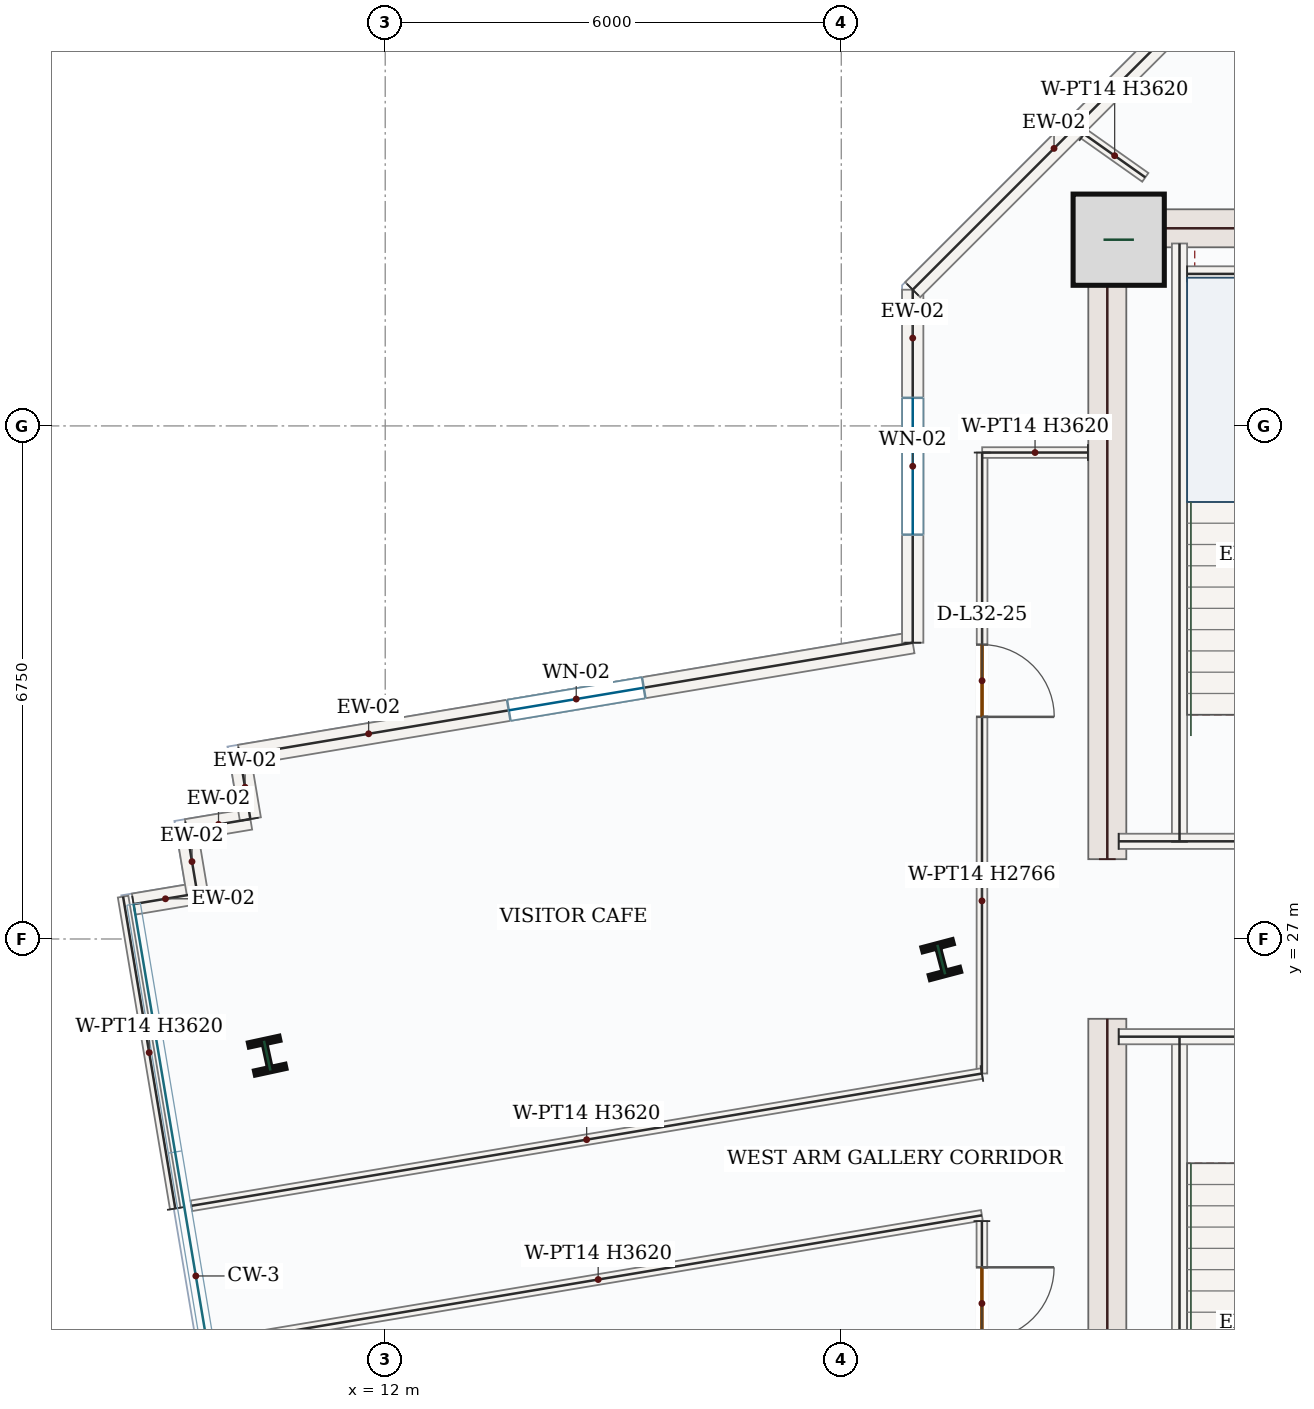
"""IFC4 building model, lengths in metres.
Left out: names, types, materials, properties, quantities, classifications, styles, units other than length and angle.
Written with IfcOpenShell. Run it as: python <this file> out.ifc"""

import sys

from ifc_helpers import new_model, si_unit, direction, frame, frame_2d, origin, origin_2d, place, context, subcontext, project, spatial, rectangle, i_section, extrude, source, transform, mapped, element, fill, save


model = new_model("IFC4")
c1 = context("Model", 3, precision=1e-05, world=origin(), true_north=direction((0.0, 1.0)))
c2 = subcontext(c1, "Body", "Model", "MODEL_VIEW")
j1 = project(units=[si_unit("LENGTHUNIT", "METRE"), si_unit("PLANEANGLEUNIT", "RADIAN")], contexts=[c1])
p1 = place(None, origin())
s1 = spatial("IfcSite", under=j1, at=p1, CompositionType="ELEMENT")
p2 = place(p1, origin())
s2 = spatial("IfcBuilding", under=s1, at=p2, CompositionType="ELEMENT")
p3 = place(p2, frame((0.0, 0.0, 143.4)))
s3 = spatial("IfcBuildingStorey", under=s2, at=p3, CompositionType="ELEMENT", Elevation=143.4)
m1 = source(origin(), c2, "Body", "SweptSolid", [
    extrude(rectangle(XDim=8.55, YDim=0.5, at=frame_2d((4.275, 0.0))), origin(), (0.0, 0.0, 1.0), 3.62),
])
for number, where, z_axis, x_axis in (
    (1, (21.5, 17.4, 0.0), (0.0, 0.0, 1.0), (0.0, 1.0, 0.0)),
    (2, (21.5, 28.05, 0.0), (0.0, 0.0, 1.0), (0.0, 1.0, 0.0)),
):
    element("IfcWall", number, at=place(p3, frame(where, z_axis=z_axis, x_axis=x_axis)), inside=s3, PredefinedType="SHEAR", context=c2, shape_type="MappedRepresentation", body=[
        mapped(m1, transform((0.0, 0.0, 0.0), x_axis=(1.0, 0.0, 0.0), y_axis=(0.0, 1.0, 0.0), z_axis=(0.0, 0.0, 1.0), scale=1.0)),
    ])
m2 = source(origin(), c2, "Body", "SweptSolid", [
    extrude(rectangle(XDim=7.0, YDim=0.5, at=frame_2d((3.5, 0.0))), origin(), (0.0, 0.0, 1.0), 3.62),
])
p4 = place(p3, frame((21.75, 36.35, 0.0), z_axis=(0.0, 0.0, 1.0), x_axis=(1.0, 0.0, 0.0)))
e3 = element("IfcWall", 3, at=p4, inside=s3, PredefinedType="SHEAR", context=c2, shape_type="MappedRepresentation", body=[
    mapped(m2, transform((0.0, 0.0, 0.0), x_axis=(1.0, 0.0, 0.0), y_axis=(0.0, 1.0, 0.0), z_axis=(0.0, 0.0, 1.0), scale=1.0)),
])
m3 = source(origin(), c2, "Body", "SweptSolid", [
    extrude(rectangle(XDim=1.2, YDim=1.2, at=origin_2d()), origin(), (0.0, 0.0, 1.0), 3.9),
])
p5 = place(p3, frame((21.65, 36.2, 0.0), z_axis=(0.0, 0.0, 1.0), x_axis=(1.0, 0.0, 0.0)))
e4 = element("IfcColumn", 4, at=p5, inside=s3, PredefinedType="COLUMN", context=c2, shape_type="MappedRepresentation", body=[
    mapped(m3, transform((0.0, 0.0, 0.0), x_axis=(1.0, 0.0, 0.0), y_axis=(0.0, 1.0, 0.0), z_axis=(0.0, 0.0, 1.0), scale=1.0)),
])
m4 = source(origin(), c2, "Body", "SweptSolid", [
    extrude(i_section(OverallWidth=0.412, OverallDepth=0.435, WebThickness=0.036, FlangeThickness=0.057, FilletRadius=0.018, at=origin_2d()), origin(), (0.0, 0.0, 1.0), 3.9),
])
for number, where, z_axis, x_axis in (
    (5, (19.316, 26.729, 0.0), (0.0, 0.0, 1.0), (0.967, 0.255, 0.0)),
    (6, (10.447, 25.465, 0.0), (0.0, 0.0, 1.0), (0.977, 0.211, 0.0)),
):
    element("IfcColumn", number, at=place(p3, frame(where, z_axis=z_axis, x_axis=x_axis)), inside=s3, PredefinedType="COLUMN", context=c2, shape_type="MappedRepresentation", body=[
        mapped(m4, transform((0.0, 0.0, 0.0), x_axis=(1.0, 0.0, 0.0), y_axis=(0.0, 1.0, 0.0), z_axis=(0.0, 0.0, 1.0), scale=1.0)),
    ])
m5 = source(origin(), c2, "Body", "SweptSolid", [
    extrude(rectangle(XDim=0.85, YDim=0.28, at=frame_2d((0.425, 0.0))), origin(), (0.0, 0.0, 1.0), 3.62),
])
for number, where, z_axis, x_axis in (
    (7, (8.69, 27.459, 0.0), (0.0, 0.0, 1.0), (0.986, 0.165, 0.0)),
    (8, (9.528, 27.599, 0.0), (0.0, 0.0, 1.0), (-0.165, 0.986, 0.0)),
    (9, (9.388, 28.438, 0.0), (0.0, 0.0, 1.0), (0.986, 0.165, 0.0)),
    (10, (10.226, 28.578, 0.0), (0.0, 0.0, 1.0), (-0.165, 0.986, 0.0)),
):
    element("IfcWall", number, at=place(p3, frame(where, z_axis=z_axis, x_axis=x_axis)), inside=s3, PredefinedType="SOLIDWALL", context=c2, shape_type="MappedRepresentation", body=[
        mapped(m5, transform((0.0, 0.0, 0.0), x_axis=(1.0, 0.0, 0.0), y_axis=(0.0, 1.0, 0.0), z_axis=(0.0, 0.0, 1.0), scale=1.0)),
    ])
p6 = place(p3, frame((10.086, 29.416, 0.0), z_axis=(0.0, 0.0, 1.0), x_axis=(0.98628492446, 0.165051651865, 0.0)))
e11 = element("IfcWall", 11, at=p6, inside=s3, PredefinedType="SOLIDWALL", context=c2, shape_type="SweptSolid", body=[
    extrude(rectangle(XDim=8.977, YDim=0.28, at=frame_2d((4.489, 0.0))), origin(), (0.0, 0.0, 1.0), 3.62),
])
p7 = place(p6, frame((3.589, 0.0, 0.85)))
e12 = element("IfcOpeningElement", 12, at=p7, cuts=e11, PredefinedType="OPENING", context=c2, shape_type="SweptSolid", body=[
    extrude(rectangle(XDim=1.8, YDim=1.75, at=frame_2d((0.9, 0.875))), frame((0.0, 0.15, 0.0), z_axis=(0.0, -1.0, 0.0), x_axis=(1.0, 0.0, 0.0)), (0.0, 0.0, 1.0), 0.3),
])
p8 = place(p3, frame((18.94, 30.898, 0.0), z_axis=(0.0, 0.0, 1.0), x_axis=(0.0, 1.0, 0.0)))
e13 = element("IfcWall", 13, at=p8, inside=s3, PredefinedType="SOLIDWALL", context=c2, shape_type="SweptSolid", body=[
    extrude(rectangle(XDim=4.644, YDim=0.28, at=frame_2d((2.322, 0.0))), origin(), (0.0, 0.0, 1.0), 3.62),
])
p9 = place(p8, frame((1.422, 0.0, 0.85)))
e14 = element("IfcOpeningElement", 14, at=p9, cuts=e13, PredefinedType="OPENING", context=c2, shape_type="SweptSolid", body=[
    extrude(rectangle(XDim=1.8, YDim=1.75, at=frame_2d((0.9, 0.875))), frame((0.0, 0.15, 0.0), z_axis=(0.0, -1.0, 0.0), x_axis=(1.0, 0.0, 0.0)), (0.0, 0.0, 1.0), 0.3),
])
m6 = source(origin(), c2, "Body", "SweptSolid", [
    extrude(rectangle(XDim=5.258, YDim=0.28, at=frame_2d((2.629, 0.0))), origin(), (0.0, 0.0, 1.0), 3.62),
])
p10 = place(p3, frame((18.94, 35.542, 0.0), z_axis=(0.0, 0.0, 1.0), x_axis=(0.707106781187, 0.707106781187, 0.0)))
e15 = element("IfcWall", 15, at=p10, inside=s3, PredefinedType="SOLIDWALL", context=c2, shape_type="MappedRepresentation", body=[
    mapped(m6, transform((0.0, 0.0, 0.0), x_axis=(1.0, 0.0, 0.0), y_axis=(0.0, 1.0, 0.0), z_axis=(0.0, 0.0, 1.0), scale=1.0)),
])
m7 = source(origin(), c2, "Body", "SweptSolid", [
    extrude(rectangle(XDim=7.87, YDim=0.2, at=frame_2d((3.935, 0.0))), origin(), (0.0, 0.0, 1.0), 3.62),
])
for number, where, z_axis, x_axis in (
    (16, (22.45, 17.85, 0.0), (0.0, 0.0, 1.0), (0.0, 1.0, 0.0)),
    (17, (22.45, 28.28, 0.0), (0.0, 0.0, 1.0), (0.0, 1.0, 0.0)),
):
    element("IfcWall", number, at=place(p3, frame(where, z_axis=z_axis, x_axis=x_axis)), inside=s3, PredefinedType="SOLIDWALL", context=c2, shape_type="MappedRepresentation", body=[
        mapped(m7, transform((0.0, 0.0, 0.0), x_axis=(1.0, 0.0, 0.0), y_axis=(0.0, 1.0, 0.0), z_axis=(0.0, 0.0, 1.0), scale=1.0)),
    ])
m8 = source(origin(), c2, "Body", "SweptSolid", [
    extrude(rectangle(XDim=4.25, YDim=0.2, at=frame_2d((2.125, 0.0))), origin(), (0.0, 0.0, 1.0), 3.62),
])
for number, where, z_axis, x_axis in (
    (18, (21.65, 25.715, 0.0), (0.0, 0.0, 1.0), (1.0, 0.0, 0.0)),
    (19, (21.65, 28.285, 0.0), (0.0, 0.0, 1.0), (1.0, 0.0, 0.0)),
):
    element("IfcWall", number, at=place(p3, frame(where, z_axis=z_axis, x_axis=x_axis)), inside=s3, PredefinedType="SOLIDWALL", context=c2, shape_type="MappedRepresentation", body=[
        mapped(m8, transform((0.0, 0.0, 0.0), x_axis=(1.0, 0.0, 0.0), y_axis=(0.0, 1.0, 0.0), z_axis=(0.0, 0.0, 1.0), scale=1.0)),
    ])
m9 = source(origin(), c2, "Body", "SweptSolid", [
    extrude(rectangle(XDim=3.25, YDim=0.2, at=frame_2d((1.625, 0.0))), origin(), (0.0, 0.0, 1.0), 3.62),
])
p11 = place(p3, frame((22.55, 35.75, 0.0), z_axis=(0.0, 0.0, 1.0), x_axis=(1.0, 0.0, 0.0)))
e20 = element("IfcWall", 20, at=p11, inside=s3, PredefinedType="SOLIDWALL", context=c2, shape_type="MappedRepresentation", body=[
    mapped(m9, transform((0.0, 0.0, 0.0), x_axis=(1.0, 0.0, 0.0), y_axis=(0.0, 1.0, 0.0), z_axis=(0.0, 0.0, 1.0), scale=1.0)),
])
p12 = place(p3, frame((19.854, 33.399, 0.0), z_axis=(0.0, 0.0, 1.0), x_axis=(-0.000448283031, -0.999999899521, 0.0)))
e21 = element("IfcWall", 21, at=p12, inside=s3, PredefinedType="PARTITIONING", context=c2, shape_type="SweptSolid", body=[
    extrude(rectangle(XDim=8.169, YDim=0.14, at=frame_2d((4.084, 0.0))), origin(), (0.0, 0.0, 1.0), 2.766),
])
p13 = place(p12, frame((2.527, 0.0, 0.0)))
e22 = element("IfcOpeningElement", 22, at=p13, cuts=e21, PredefinedType="OPENING", context=c2, shape_type="SweptSolid", body=[
    extrude(rectangle(XDim=0.95, YDim=2.15, at=frame_2d((0.475, 1.075))), frame((0.0, 0.08, 0.0), z_axis=(0.0, -1.0, 0.0), x_axis=(1.0, 0.0, 0.0)), (0.0, 0.0, 1.0), 0.16),
])
m10 = source(origin(), c2, "Body", "SweptSolid", [
    extrude(rectangle(XDim=10.544, YDim=0.14, at=frame_2d((5.272, 0.0))), origin(), (0.0, 0.0, 1.0), 3.62),
])
p14 = place(p3, frame((19.85, 25.23, 0.0), z_axis=(0.0, 0.0, 1.0), x_axis=(-0.986287336963, -0.165037235031, 0.0)))
e23 = element("IfcWall", 23, at=p14, inside=s3, PredefinedType="PARTITIONING", context=c2, shape_type="MappedRepresentation", body=[
    mapped(m10, transform((0.0, 0.0, 0.0), x_axis=(1.0, 0.0, 0.0), y_axis=(0.0, 1.0, 0.0), z_axis=(0.0, 0.0, 1.0), scale=1.0)),
])
m11 = source(origin(), c2, "Body", "SweptSolid", [
    extrude(rectangle(XDim=4.16, YDim=0.14, at=frame_2d((2.08, 0.0))), origin(), (0.0, 0.0, 1.0), 3.62),
])
p15 = place(p3, frame((9.238, 23.454, 0.0), z_axis=(0.0, 0.0, 1.0), x_axis=(-0.165027060507, 0.98628903943, 0.0)))
e24 = element("IfcWall", 24, at=p15, inside=s3, PredefinedType="PARTITIONING", context=c2, shape_type="MappedRepresentation", body=[
    mapped(m11, transform((0.0, 0.0, 0.0), x_axis=(1.0, 0.0, 0.0), y_axis=(0.0, 1.0, 0.0), z_axis=(0.0, 0.0, 1.0), scale=1.0)),
])
m12 = source(origin(), c2, "Body", "SweptSolid", [
    extrude(rectangle(XDim=0.988, YDim=0.14, at=frame_2d((0.494, 0.0))), origin(), (0.0, 0.0, 1.0), 3.62),
])
p16 = place(p3, frame((21.193, 37.59, 0.0), z_axis=(0.0, 0.0, 1.0), x_axis=(0.81652929337, -0.577304004029, 0.0)))
e25 = element("IfcWall", 25, at=p16, inside=s3, PredefinedType="PARTITIONING", context=c2, shape_type="MappedRepresentation", body=[
    mapped(m12, transform((0.0, 0.0, 0.0), x_axis=(1.0, 0.0, 0.0), y_axis=(0.0, 1.0, 0.0), z_axis=(0.0, 0.0, 1.0), scale=1.0)),
])
m13 = source(origin(), c2, "Body", "SweptSolid", [
    extrude(rectangle(XDim=1.391, YDim=0.14, at=frame_2d((0.696, 0.0))), origin(), (0.0, 0.0, 1.0), 3.62),
])
p17 = place(p3, frame((21.245, 33.4, 0.0), z_axis=(0.0, 0.0, 1.0), x_axis=(-0.999999938421, -0.00035093874, 0.0)))
e26 = element("IfcWall", 26, at=p17, inside=s3, PredefinedType="PARTITIONING", context=c2, shape_type="MappedRepresentation", body=[
    mapped(m13, transform((0.0, 0.0, 0.0), x_axis=(1.0, 0.0, 0.0), y_axis=(0.0, 1.0, 0.0), z_axis=(0.0, 0.0, 1.0), scale=1.0)),
])
m14 = source(origin(), c2, "Body", "SweptSolid", [
    extrude(rectangle(XDim=10.237, YDim=0.14, at=frame_2d((5.118, 0.0))), origin(), (0.0, 0.0, 1.0), 3.62),
])
p18 = place(p3, frame((9.754, 21.675, 0.0), z_axis=(0.0, 0.0, 1.0), x_axis=(0.986290594835, 0.165017764319, 0.0)))
e27 = element("IfcWall", 27, at=p18, inside=s3, PredefinedType="PARTITIONING", context=c2, shape_type="MappedRepresentation", body=[
    mapped(m14, transform((0.0, 0.0, 0.0), x_axis=(1.0, 0.0, 0.0), y_axis=(0.0, 1.0, 0.0), z_axis=(0.0, 0.0, 1.0), scale=1.0)),
])
p19 = place(p3, frame((19.85, 23.289, 0.0), z_axis=(0.0, 0.0, 1.0), x_axis=(0.000363372069, -0.99999993398, 0.0)))
e28 = element("IfcWall", 28, at=p19, inside=s3, PredefinedType="PARTITIONING", context=c2, shape_type="SweptSolid", body=[
    extrude(rectangle(XDim=2.688, YDim=0.14, at=frame_2d((1.344, 0.0))), origin(), (0.0, 0.0, 1.0), 3.149),
])
p20 = place(p19, frame((0.608, 0.0, 0.0)))
e29 = element("IfcOpeningElement", 29, at=p20, cuts=e28, PredefinedType="OPENING", context=c2, shape_type="SweptSolid", body=[
    extrude(rectangle(XDim=0.95, YDim=2.15, at=frame_2d((0.475, 1.075))), frame((0.0, 0.08, 0.0), z_axis=(0.0, -1.0, 0.0), x_axis=(1.0, 0.0, 0.0)), (0.0, 0.0, 1.0), 0.16),
])
m15 = source(origin(), c2, "Body", "SweptSolid", [
    extrude(rectangle(XDim=1.8, YDim=1.75, at=frame_2d((0.9, 0.875))), frame((0.0, 0.03, 0.0), z_axis=(0.0, -1.0, 0.0), x_axis=(1.0, 0.0, 0.0)), (0.0, 0.0, 1.0), 0.06),
])
p21 = place(p7, origin())
e30 = element("IfcWindow", 30, at=p21, inside=s3, PartitioningType="DOUBLE_PANEL_VERTICAL", PredefinedType="WINDOW", context=c2, shape_type="MappedRepresentation", body=[
    mapped(m15, transform((0.0, 0.0, 0.0), x_axis=(1.0, 0.0, 0.0), y_axis=(0.0, 1.0, 0.0), z_axis=(0.0, 0.0, 1.0), scale=1.0)),
])
fill(e12, e30)
p22 = place(p9, origin())
e31 = element("IfcWindow", 31, at=p22, inside=s3, PartitioningType="DOUBLE_PANEL_VERTICAL", PredefinedType="WINDOW", context=c2, shape_type="MappedRepresentation", body=[
    mapped(m15, transform((0.0, 0.0, 0.0), x_axis=(1.0, 0.0, 0.0), y_axis=(0.0, 1.0, 0.0), z_axis=(0.0, 0.0, 1.0), scale=1.0)),
])
fill(e14, e31)
m16 = source(origin(), c2, "Body", "SweptSolid", [
    extrude(rectangle(XDim=0.95, YDim=2.15, at=frame_2d((0.475, 1.075))), frame((0.0, 0.025, 0.0), z_axis=(0.0, -1.0, 0.0), x_axis=(1.0, 0.0, 0.0)), (0.0, 0.0, 1.0), 0.05),
])
p23 = place(p13, origin())
e32 = element("IfcDoor", 32, at=p23, inside=s3, OperationType="SINGLE_SWING_RIGHT", PredefinedType="DOOR", context=c2, shape_type="MappedRepresentation", body=[
    mapped(m16, transform((0.0, 0.0, 0.0), x_axis=(1.0, 0.0, 0.0), y_axis=(0.0, 1.0, 0.0), z_axis=(0.0, 0.0, 1.0), scale=1.0)),
])
fill(e22, e32)
p24 = place(p20, origin())
e33 = element("IfcDoor", 33, at=p24, inside=s3, OperationType="SINGLE_SWING_LEFT", PredefinedType="DOOR", context=c2, shape_type="MappedRepresentation", body=[
    mapped(m16, transform((0.0, 0.0, 0.0), x_axis=(1.0, 0.0, 0.0), y_axis=(0.0, 1.0, 0.0), z_axis=(0.0, 0.0, 1.0), scale=1.0)),
])
fill(e29, e33)
save(model, sys.argv[1])
